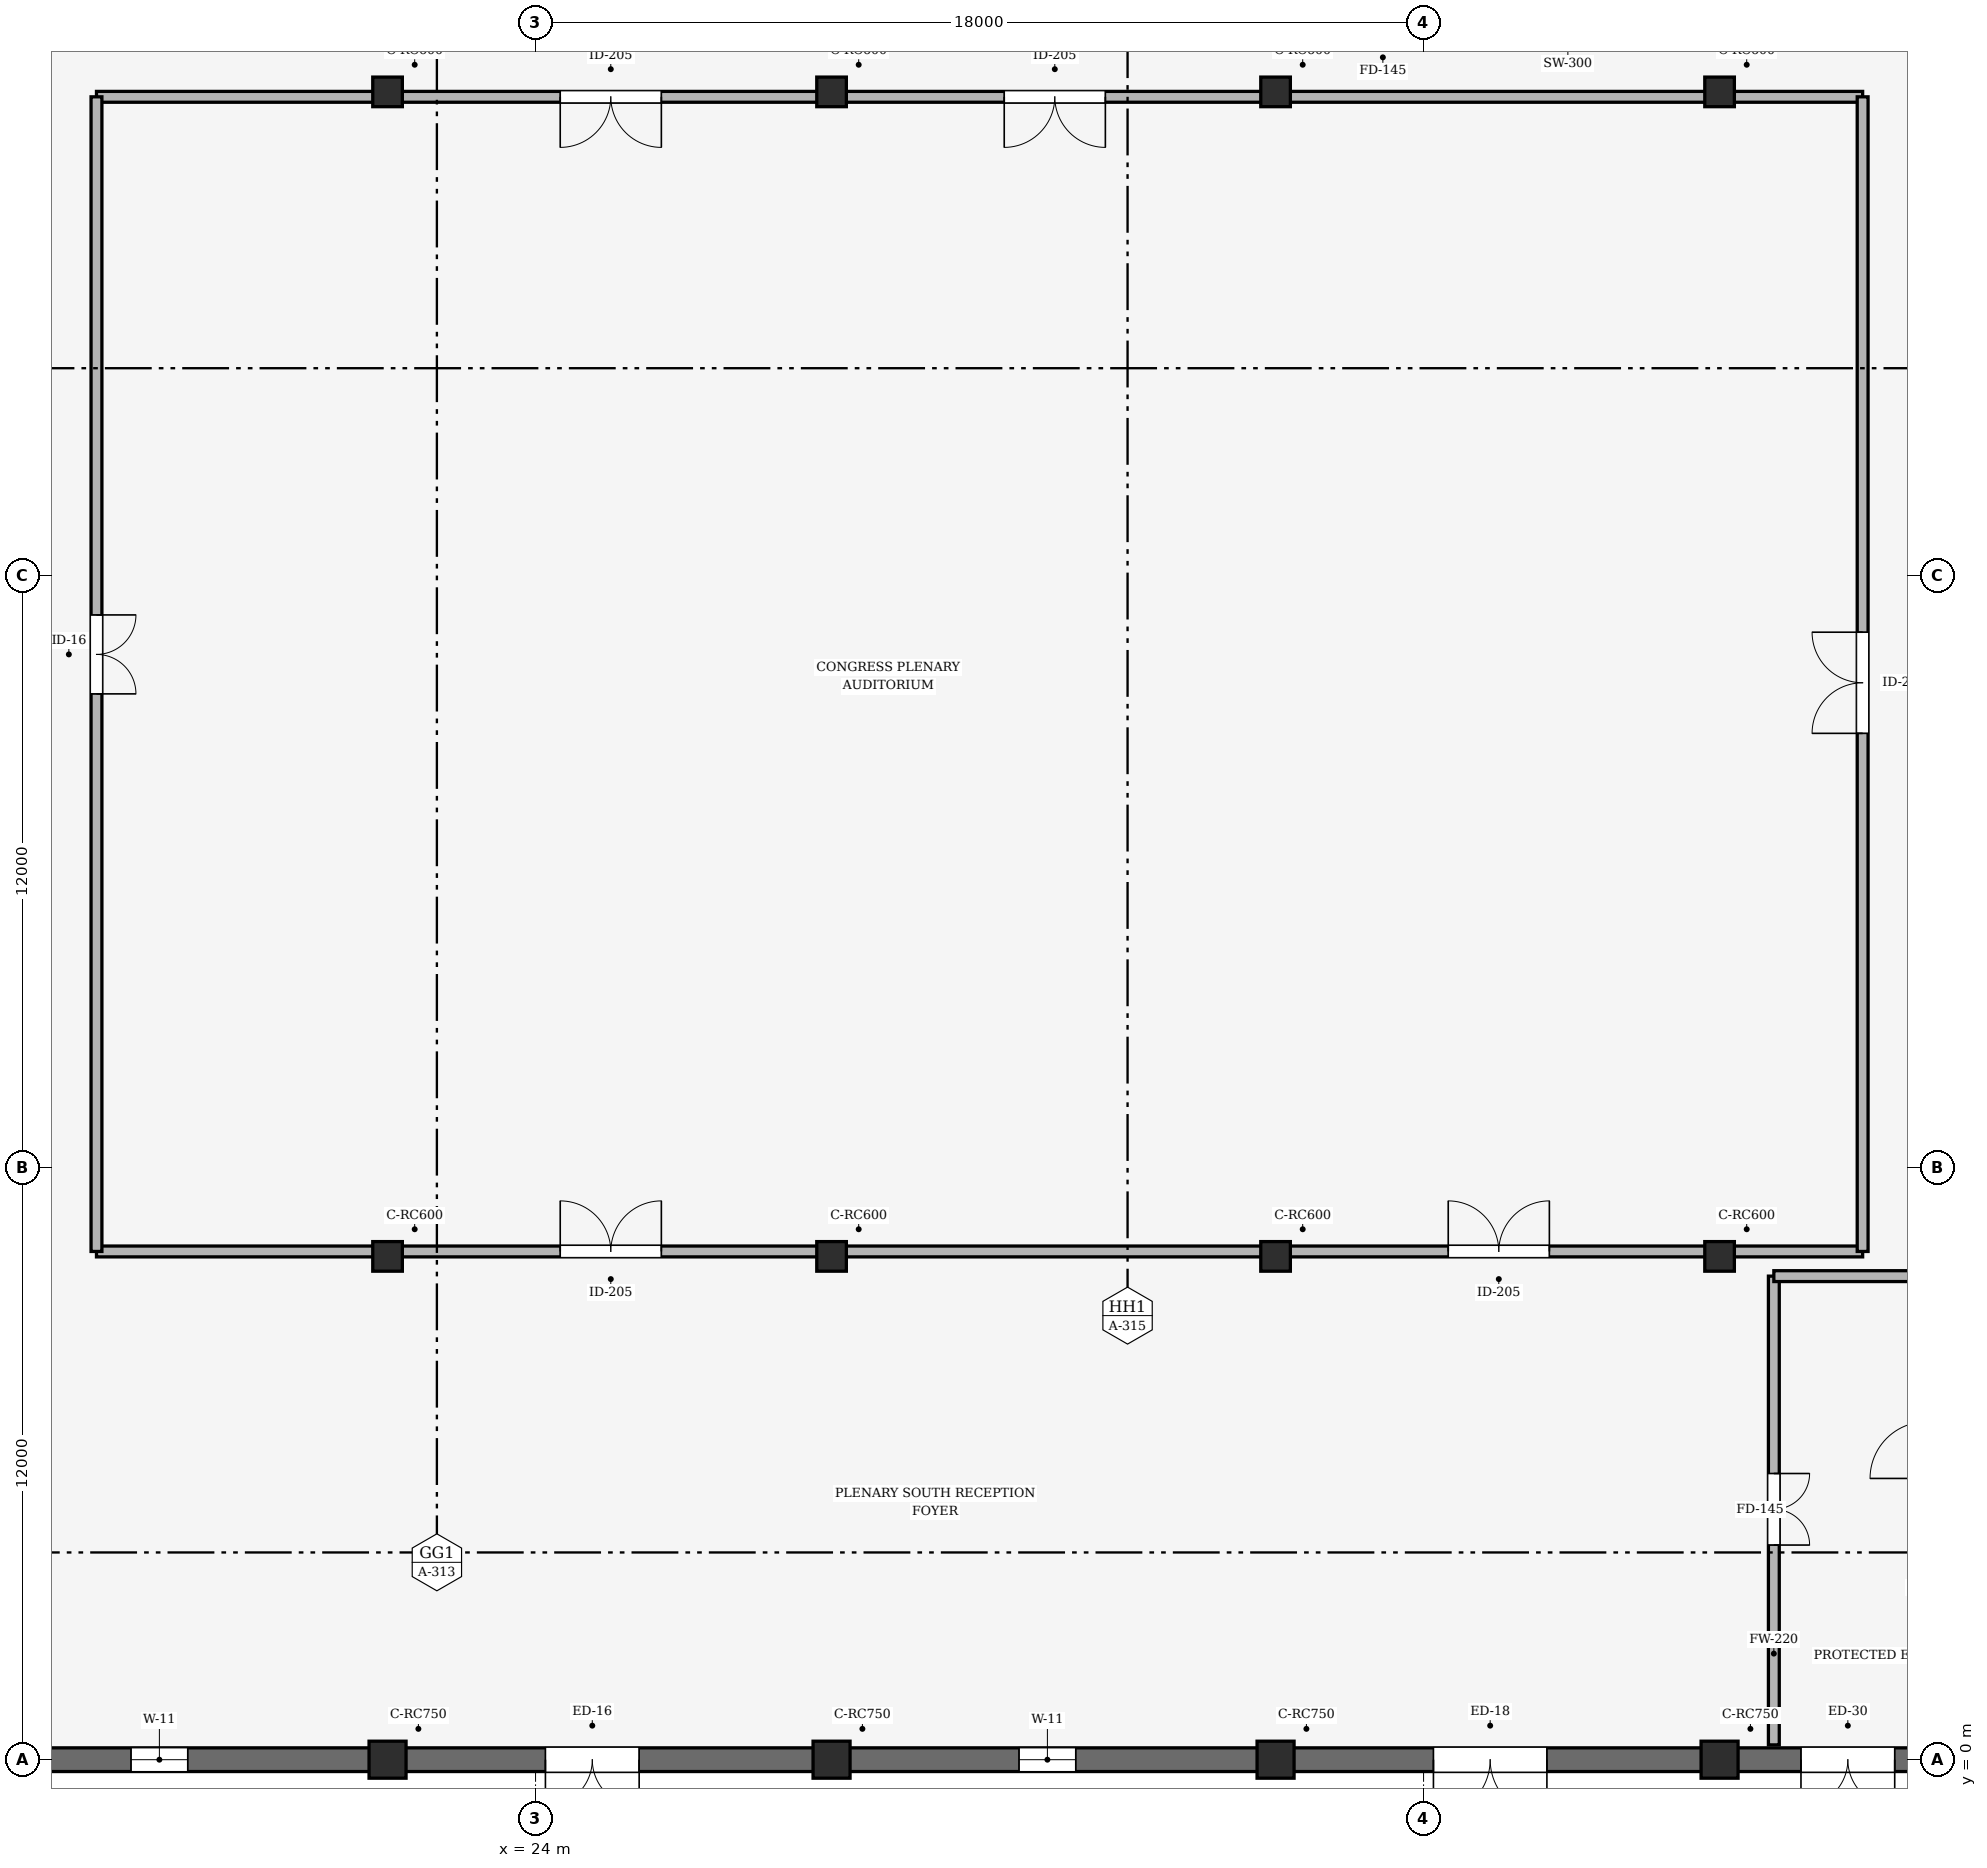
"""IFC4 building model, lengths in metres.
Left out: names, types, materials, properties, quantities, classifications, styles, units other than length and angle.
Written with IfcOpenShell. Run it as: python <this file> out.ifc"""

import sys

from ifc_helpers import new_model, si_unit, direction, frame, frame_2d, origin, origin_2d, place, context, subcontext, project, spatial, rectangle, extrude, element, fill, save


model = new_model("IFC4")
c1 = context("Model", 3, precision=1e-05, world=origin(), true_north=direction((0.0, 1.0)))
c2 = subcontext(c1, "Body", "Model", "MODEL_VIEW")
j1 = project(units=[si_unit("LENGTHUNIT", "METRE"), si_unit("PLANEANGLEUNIT", "RADIAN")], contexts=[c1])
p1 = place(None, origin())
s1 = spatial("IfcSite", under=j1, at=p1, CompositionType="ELEMENT")
p2 = place(p1, origin())
s2 = spatial("IfcBuilding", under=s1, at=p2, CompositionType="ELEMENT")
p3 = place(p2, origin())
s3 = spatial("IfcBuildingStorey", under=s2, at=p3, CompositionType="ELEMENT", Elevation=0.0)
p4 = place(p3, frame((21.0, 0.0, -0.44), z_axis=(0.0, 0.0, 1.0), x_axis=(1.0, 0.0, 0.0)))
e1 = element("IfcColumn", 1, at=p4, inside=s3, PredefinedType="COLUMN", context=c2, shape_type="SweptSolid", body=[
    extrude(rectangle(XDim=0.75, YDim=0.75, at=origin_2d()), origin(), (0.0, 0.0, 1.0), 5.84),
])
for number, where, z_axis, x_axis in (
    (2, (21.0, 10.2, -0.44), (0.0, 0.0, 1.0), (1.0, 0.0, 0.0)),
    (3, (21.0, 33.8, -0.44), (0.0, 0.0, 1.0), (1.0, 0.0, 0.0)),
):
    element("IfcColumn", number, at=place(p3, frame(where, z_axis=z_axis, x_axis=x_axis)), inside=s3, PredefinedType="COLUMN", context=c2, shape_type="SweptSolid", body=[
        extrude(rectangle(XDim=0.6, YDim=0.6, at=origin_2d()), origin(), (0.0, 0.0, 1.0), 5.84),
    ])
p5 = place(p3, frame((30.0, 0.0, -0.44), z_axis=(0.0, 0.0, 1.0), x_axis=(1.0, 0.0, 0.0)))
e4 = element("IfcColumn", 4, at=p5, inside=s3, PredefinedType="COLUMN", context=c2, shape_type="SweptSolid", body=[
    extrude(rectangle(XDim=0.75, YDim=0.75, at=origin_2d()), origin(), (0.0, 0.0, 1.0), 5.84),
])
for number, where, z_axis, x_axis in (
    (5, (30.0, 10.2, -0.44), (0.0, 0.0, 1.0), (1.0, 0.0, 0.0)),
    (6, (30.0, 33.8, -0.44), (0.0, 0.0, 1.0), (1.0, 0.0, 0.0)),
):
    element("IfcColumn", number, at=place(p3, frame(where, z_axis=z_axis, x_axis=x_axis)), inside=s3, PredefinedType="COLUMN", context=c2, shape_type="SweptSolid", body=[
        extrude(rectangle(XDim=0.6, YDim=0.6, at=origin_2d()), origin(), (0.0, 0.0, 1.0), 5.84),
    ])
p6 = place(p3, frame((39.0, 0.0, -0.44), z_axis=(0.0, 0.0, 1.0), x_axis=(1.0, 0.0, 0.0)))
e7 = element("IfcColumn", 7, at=p6, inside=s3, PredefinedType="COLUMN", context=c2, shape_type="SweptSolid", body=[
    extrude(rectangle(XDim=0.75, YDim=0.75, at=origin_2d()), origin(), (0.0, 0.0, 1.0), 5.84),
])
for number, where, z_axis, x_axis in (
    (8, (39.0, 10.2, -0.44), (0.0, 0.0, 1.0), (1.0, 0.0, 0.0)),
    (9, (39.0, 33.8, -0.44), (0.0, 0.0, 1.0), (1.0, 0.0, 0.0)),
):
    element("IfcColumn", number, at=place(p3, frame(where, z_axis=z_axis, x_axis=x_axis)), inside=s3, PredefinedType="COLUMN", context=c2, shape_type="SweptSolid", body=[
        extrude(rectangle(XDim=0.6, YDim=0.6, at=origin_2d()), origin(), (0.0, 0.0, 1.0), 5.84),
    ])
p7 = place(p3, frame((48.0, 0.0, -0.44), z_axis=(0.0, 0.0, 1.0), x_axis=(1.0, 0.0, 0.0)))
e10 = element("IfcColumn", 10, at=p7, inside=s3, PredefinedType="COLUMN", context=c2, shape_type="SweptSolid", body=[
    extrude(rectangle(XDim=0.75, YDim=0.75, at=origin_2d()), origin(), (0.0, 0.0, 1.0), 5.84),
])
for number, where, z_axis, x_axis in (
    (11, (48.0, 10.2, -0.44), (0.0, 0.0, 1.0), (1.0, 0.0, 0.0)),
    (12, (48.0, 33.8, -0.44), (0.0, 0.0, 1.0), (1.0, 0.0, 0.0)),
):
    element("IfcColumn", number, at=place(p3, frame(where, z_axis=z_axis, x_axis=x_axis)), inside=s3, PredefinedType="COLUMN", context=c2, shape_type="SweptSolid", body=[
        extrude(rectangle(XDim=0.6, YDim=0.6, at=origin_2d()), origin(), (0.0, 0.0, 1.0), 5.84),
    ])
p8 = place(p3, frame((12.0, 0.0, 0.0), z_axis=(0.0, 0.0, 1.0), x_axis=(1.0, 0.0, 0.0)))
e13 = element("IfcWall", 13, at=p8, inside=s3, PredefinedType="SOLIDWALL", context=c2, shape_type="SweptSolid", body=[
    extrude(rectangle(XDim=9.0, YDim=0.48, at=frame_2d((4.5, 0.0))), origin(), (0.0, 0.0, 1.0), 4.65),
])
p9 = place(p8, frame((3.8, 0.0, 1.3)))
e14 = element("IfcOpeningElement", 14, at=p9, cuts=e13, PredefinedType="OPENING", context=c2, shape_type="SweptSolid", body=[
    extrude(rectangle(XDim=1.15, YDim=1.7, at=frame_2d((0.575, 0.85))), frame((0.0, 0.25, 0.0), z_axis=(0.0, -1.0, 0.0), x_axis=(1.0, 0.0, 0.0)), (0.0, 0.0, 1.0), 0.5),
])
p10 = place(p3, frame((21.0, 0.0, 0.0), z_axis=(0.0, 0.0, 1.0), x_axis=(1.0, 0.0, 0.0)))
e15 = element("IfcWall", 15, at=p10, inside=s3, PredefinedType="SOLIDWALL", context=c2, shape_type="SweptSolid", body=[
    extrude(rectangle(XDim=9.0, YDim=0.48, at=frame_2d((4.5, 0.0))), origin(), (0.0, 0.0, 1.0), 4.65),
])
p11 = place(p10, frame((3.2, 0.0, 0.0)))
e16 = element("IfcOpeningElement", 16, at=p11, cuts=e15, PredefinedType="OPENING", context=c2, shape_type="SweptSolid", body=[
    extrude(rectangle(XDim=1.9, YDim=2.35, at=frame_2d((0.95, 1.175))), frame((0.0, 0.25, 0.0), z_axis=(0.0, -1.0, 0.0), x_axis=(1.0, 0.0, 0.0)), (0.0, 0.0, 1.0), 0.5),
])
p12 = place(p3, frame((30.0, 0.0, 0.0), z_axis=(0.0, 0.0, 1.0), x_axis=(1.0, 0.0, 0.0)))
e17 = element("IfcWall", 17, at=p12, inside=s3, PredefinedType="SOLIDWALL", context=c2, shape_type="SweptSolid", body=[
    extrude(rectangle(XDim=9.0, YDim=0.48, at=frame_2d((4.5, 0.0))), origin(), (0.0, 0.0, 1.0), 4.65),
])
p13 = place(p12, frame((3.8, 0.0, 1.3)))
e18 = element("IfcOpeningElement", 18, at=p13, cuts=e17, PredefinedType="OPENING", context=c2, shape_type="SweptSolid", body=[
    extrude(rectangle(XDim=1.15, YDim=1.7, at=frame_2d((0.575, 0.85))), frame((0.0, 0.25, 0.0), z_axis=(0.0, -1.0, 0.0), x_axis=(1.0, 0.0, 0.0)), (0.0, 0.0, 1.0), 0.5),
])
p14 = place(p3, frame((39.0, 0.0, 0.0), z_axis=(0.0, 0.0, 1.0), x_axis=(1.0, 0.0, 0.0)))
e19 = element("IfcWall", 19, at=p14, inside=s3, PredefinedType="SOLIDWALL", context=c2, shape_type="SweptSolid", body=[
    extrude(rectangle(XDim=9.0, YDim=0.48, at=frame_2d((4.5, 0.0))), origin(), (0.0, 0.0, 1.0), 4.65),
])
p15 = place(p14, frame((3.2, 0.0, 0.0)))
e20 = element("IfcOpeningElement", 20, at=p15, cuts=e19, PredefinedType="OPENING", context=c2, shape_type="SweptSolid", body=[
    extrude(rectangle(XDim=2.3, YDim=2.55, at=frame_2d((1.15, 1.275))), frame((0.0, 0.25, 0.0), z_axis=(0.0, -1.0, 0.0), x_axis=(1.0, 0.0, 0.0)), (0.0, 0.0, 1.0), 0.5),
])
p16 = place(p3, frame((48.0, 0.0, 0.0), z_axis=(0.0, 0.0, 1.0), x_axis=(1.0, 0.0, 0.0)))
e21 = element("IfcWall", 21, at=p16, inside=s3, PredefinedType="SOLIDWALL", context=c2, shape_type="SweptSolid", body=[
    extrude(rectangle(XDim=9.0, YDim=0.48, at=frame_2d((4.5, 0.0))), origin(), (0.0, 0.0, 1.0), 4.65),
])
p17 = place(p16, frame((1.65, 0.0, 0.0)))
e22 = element("IfcOpeningElement", 22, at=p17, cuts=e21, PredefinedType="OPENING", context=c2, shape_type="SweptSolid", body=[
    extrude(rectangle(XDim=1.9, YDim=2.35, at=frame_2d((0.95, 1.175))), frame((0.0, 0.25, 0.0), z_axis=(0.0, -1.0, 0.0), x_axis=(1.0, 0.0, 0.0)), (0.0, 0.0, 1.0), 0.5),
])
p18 = place(p3, frame((49.1, 9.8, 0.0), z_axis=(0.0, 0.0, 1.0), x_axis=(0.0, -1.0, 0.0)))
e23 = element("IfcWall", 23, at=p18, inside=s3, PredefinedType="SOLIDWALL", context=c2, shape_type="SweptSolid", body=[
    extrude(rectangle(XDim=9.5, YDim=0.22, at=frame_2d((4.75, 0.0))), origin(), (0.0, 0.0, 1.0), 4.6),
])
p19 = place(p18, frame((4.0, 0.0, 0.0)))
e24 = element("IfcOpeningElement", 24, at=p19, cuts=e23, PredefinedType="OPENING", context=c2, shape_type="SweptSolid", body=[
    extrude(rectangle(XDim=1.45, YDim=2.15, at=frame_2d((0.725, 1.075))), frame((0.0, 0.12, 0.0), z_axis=(0.0, -1.0, 0.0), x_axis=(1.0, 0.0, 0.0)), (0.0, 0.0, 1.0), 0.24),
])
p20 = place(p3, frame((49.1, 9.8, 0.0), z_axis=(0.0, 0.0, 1.0), x_axis=(1.0, 0.0, 0.0)))
e25 = element("IfcWall", 25, at=p20, inside=s3, PredefinedType="SOLIDWALL", context=c2, shape_type="SweptSolid", body=[
    extrude(rectangle(XDim=2.9, YDim=0.22, at=frame_2d((1.45, 0.0))), origin(), (0.0, 0.0, 1.0), 4.6),
])
p21 = place(p3, frame((15.1, 10.3, 0.0), z_axis=(0.0, 0.0, 1.0), x_axis=(1.0, 0.0, 0.0)))
e26 = element("IfcWall", 26, at=p21, inside=s3, PredefinedType="SOLIDWALL", context=c2, shape_type="SweptSolid", body=[
    extrude(rectangle(XDim=35.8, YDim=0.22, at=frame_2d((17.9, 0.0))), origin(), (0.0, 0.0, 1.0), 4.1),
])
p22 = place(p21, frame((9.4, 0.0, 0.0)))
e27 = element("IfcOpeningElement", 27, at=p22, cuts=e26, PredefinedType="OPENING", context=c2, shape_type="SweptSolid", body=[
    extrude(rectangle(XDim=2.05, YDim=2.3, at=frame_2d((1.025, 1.15))), frame((0.0, 0.12, 0.0), z_axis=(0.0, -1.0, 0.0), x_axis=(1.0, 0.0, 0.0)), (0.0, 0.0, 1.0), 0.24),
])
p23 = place(p21, frame((27.4, 0.0, 0.0)))
e28 = element("IfcOpeningElement", 28, at=p23, cuts=e26, PredefinedType="OPENING", context=c2, shape_type="SweptSolid", body=[
    extrude(rectangle(XDim=2.05, YDim=2.3, at=frame_2d((1.025, 1.15))), frame((0.0, 0.12, 0.0), z_axis=(0.0, -1.0, 0.0), x_axis=(1.0, 0.0, 0.0)), (0.0, 0.0, 1.0), 0.24),
])
p24 = place(p3, frame((50.9, 33.7, 0.0), z_axis=(0.0, 0.0, 1.0), x_axis=(-1.0, 0.0, 0.0)))
e29 = element("IfcWall", 29, at=p24, inside=s3, PredefinedType="SOLIDWALL", context=c2, shape_type="SweptSolid", body=[
    extrude(rectangle(XDim=35.8, YDim=0.22, at=frame_2d((17.9, 0.0))), origin(), (0.0, 0.0, 1.0), 4.1),
])
p25 = place(p24, frame((15.35, 0.0, 0.0)))
e30 = element("IfcOpeningElement", 30, at=p25, cuts=e29, PredefinedType="OPENING", context=c2, shape_type="SweptSolid", body=[
    extrude(rectangle(XDim=2.05, YDim=2.3, at=frame_2d((1.025, 1.15))), frame((0.0, 0.12, 0.0), z_axis=(0.0, -1.0, 0.0), x_axis=(1.0, 0.0, 0.0)), (0.0, 0.0, 1.0), 0.24),
])
p26 = place(p24, frame((24.35, 0.0, 0.0)))
e31 = element("IfcOpeningElement", 31, at=p26, cuts=e29, PredefinedType="OPENING", context=c2, shape_type="SweptSolid", body=[
    extrude(rectangle(XDim=2.05, YDim=2.3, at=frame_2d((1.025, 1.15))), frame((0.0, 0.12, 0.0), z_axis=(0.0, -1.0, 0.0), x_axis=(1.0, 0.0, 0.0)), (0.0, 0.0, 1.0), 0.24),
])
p27 = place(p3, frame((50.9, 10.3, 0.0), z_axis=(0.0, 0.0, 1.0), x_axis=(0.0, 1.0, 0.0)))
e32 = element("IfcWall", 32, at=p27, inside=s3, PredefinedType="SOLIDWALL", context=c2, shape_type="SweptSolid", body=[
    extrude(rectangle(XDim=23.4, YDim=0.22, at=frame_2d((11.7, 0.0))), origin(), (0.0, 0.0, 1.0), 4.1),
])
p28 = place(p27, frame((10.5, 0.0, 0.0)))
e33 = element("IfcOpeningElement", 33, at=p28, cuts=e32, PredefinedType="OPENING", context=c2, shape_type="SweptSolid", body=[
    extrude(rectangle(XDim=2.05, YDim=2.3, at=frame_2d((1.025, 1.15))), frame((0.0, 0.12, 0.0), z_axis=(0.0, -1.0, 0.0), x_axis=(1.0, 0.0, 0.0)), (0.0, 0.0, 1.0), 0.24),
])
p29 = place(p3, frame((15.1, 33.7, 0.0), z_axis=(0.0, 0.0, 1.0), x_axis=(0.0, -1.0, 0.0)))
e34 = element("IfcWall", 34, at=p29, inside=s3, PredefinedType="SOLIDWALL", context=c2, shape_type="SweptSolid", body=[
    extrude(rectangle(XDim=23.4, YDim=0.22, at=frame_2d((11.7, 0.0))), origin(), (0.0, 0.0, 1.0), 4.1),
])
p30 = place(p29, frame((10.5, 0.0, 0.0)))
e35 = element("IfcOpeningElement", 35, at=p30, cuts=e34, PredefinedType="OPENING", context=c2, shape_type="SweptSolid", body=[
    extrude(rectangle(XDim=1.6, YDim=2.2, at=frame_2d((0.8, 1.1))), frame((0.0, 0.12, 0.0), z_axis=(0.0, -1.0, 0.0), x_axis=(1.0, 0.0, 0.0)), (0.0, 0.0, 1.0), 0.24),
])
p31 = place(p9, origin())
e36 = element("IfcWindow", 36, at=p31, inside=s3, PartitioningType="SINGLE_PANEL", PredefinedType="WINDOW", context=c2, shape_type="SweptSolid", body=[
    extrude(rectangle(XDim=1.15, YDim=1.7, at=frame_2d((0.575, 0.85))), frame((0.0, 0.03, 0.0), z_axis=(0.0, -1.0, 0.0), x_axis=(1.0, 0.0, 0.0)), (0.0, 0.0, 1.0), 0.06),
])
fill(e14, e36)
p32 = place(p11, frame((1.9, 0.0, 0.0), z_axis=(0.0, 0.0, 1.0), x_axis=(-1.0, 0.0, 0.0)))
e37 = element("IfcDoor", 37, at=p32, inside=s3, OperationType="DOUBLE_DOOR_SINGLE_SWING", PredefinedType="DOOR", context=c2, shape_type="SweptSolid", body=[
    extrude(rectangle(XDim=1.9, YDim=2.35, at=frame_2d((0.95, 1.175))), frame((0.0, 0.025, 0.0), z_axis=(0.0, -1.0, 0.0), x_axis=(1.0, 0.0, 0.0)), (0.0, 0.0, 1.0), 0.05),
])
fill(e16, e37)
p33 = place(p13, origin())
e38 = element("IfcWindow", 38, at=p33, inside=s3, PartitioningType="SINGLE_PANEL", PredefinedType="WINDOW", context=c2, shape_type="SweptSolid", body=[
    extrude(rectangle(XDim=1.15, YDim=1.7, at=frame_2d((0.575, 0.85))), frame((0.0, 0.03, 0.0), z_axis=(0.0, -1.0, 0.0), x_axis=(1.0, 0.0, 0.0)), (0.0, 0.0, 1.0), 0.06),
])
fill(e18, e38)
p34 = place(p15, frame((2.3, 0.0, 0.0), z_axis=(0.0, 0.0, 1.0), x_axis=(-1.0, 0.0, 0.0)))
e39 = element("IfcDoor", 39, at=p34, inside=s3, OperationType="DOUBLE_DOOR_SINGLE_SWING", PredefinedType="DOOR", context=c2, shape_type="SweptSolid", body=[
    extrude(rectangle(XDim=2.3, YDim=2.55, at=frame_2d((1.15, 1.275))), frame((0.0, 0.025, 0.0), z_axis=(0.0, -1.0, 0.0), x_axis=(1.0, 0.0, 0.0)), (0.0, 0.0, 1.0), 0.05),
])
fill(e20, e39)
p35 = place(p17, frame((1.9, 0.0, 0.0), z_axis=(0.0, 0.0, 1.0), x_axis=(-1.0, 0.0, 0.0)))
e40 = element("IfcDoor", 40, at=p35, inside=s3, OperationType="DOUBLE_DOOR_SINGLE_SWING", PredefinedType="DOOR", context=c2, shape_type="SweptSolid", body=[
    extrude(rectangle(XDim=1.9, YDim=2.35, at=frame_2d((0.95, 1.175))), frame((0.0, 0.025, 0.0), z_axis=(0.0, -1.0, 0.0), x_axis=(1.0, 0.0, 0.0)), (0.0, 0.0, 1.0), 0.05),
])
fill(e22, e40)
p36 = place(p19, origin())
e41 = element("IfcDoor", 41, at=p36, inside=s3, OperationType="DOUBLE_DOOR_SINGLE_SWING", PredefinedType="DOOR", context=c2, shape_type="SweptSolid", body=[
    extrude(rectangle(XDim=1.45, YDim=2.15, at=frame_2d((0.725, 1.075))), frame((0.0, 0.025, 0.0), z_axis=(0.0, -1.0, 0.0), x_axis=(1.0, 0.0, 0.0)), (0.0, 0.0, 1.0), 0.05),
])
fill(e24, e41)
p37 = place(p22, origin())
e42 = element("IfcDoor", 42, at=p37, inside=s3, OperationType="DOUBLE_DOOR_SINGLE_SWING", PredefinedType="DOOR", context=c2, shape_type="SweptSolid", body=[
    extrude(rectangle(XDim=2.05, YDim=2.3, at=frame_2d((1.025, 1.15))), frame((0.0, 0.025, 0.0), z_axis=(0.0, -1.0, 0.0), x_axis=(1.0, 0.0, 0.0)), (0.0, 0.0, 1.0), 0.05),
])
fill(e27, e42)
p38 = place(p23, origin())
e43 = element("IfcDoor", 43, at=p38, inside=s3, OperationType="DOUBLE_DOOR_SINGLE_SWING", PredefinedType="DOOR", context=c2, shape_type="SweptSolid", body=[
    extrude(rectangle(XDim=2.05, YDim=2.3, at=frame_2d((1.025, 1.15))), frame((0.0, 0.025, 0.0), z_axis=(0.0, -1.0, 0.0), x_axis=(1.0, 0.0, 0.0)), (0.0, 0.0, 1.0), 0.05),
])
fill(e28, e43)
p39 = place(p25, origin())
e44 = element("IfcDoor", 44, at=p39, inside=s3, OperationType="DOUBLE_DOOR_SINGLE_SWING", PredefinedType="DOOR", context=c2, shape_type="SweptSolid", body=[
    extrude(rectangle(XDim=2.05, YDim=2.3, at=frame_2d((1.025, 1.15))), frame((0.0, 0.025, 0.0), z_axis=(0.0, -1.0, 0.0), x_axis=(1.0, 0.0, 0.0)), (0.0, 0.0, 1.0), 0.05),
])
fill(e30, e44)
p40 = place(p26, origin())
e45 = element("IfcDoor", 45, at=p40, inside=s3, OperationType="DOUBLE_DOOR_SINGLE_SWING", PredefinedType="DOOR", context=c2, shape_type="SweptSolid", body=[
    extrude(rectangle(XDim=2.05, YDim=2.3, at=frame_2d((1.025, 1.15))), frame((0.0, 0.025, 0.0), z_axis=(0.0, -1.0, 0.0), x_axis=(1.0, 0.0, 0.0)), (0.0, 0.0, 1.0), 0.05),
])
fill(e31, e45)
p41 = place(p28, origin())
e46 = element("IfcDoor", 46, at=p41, inside=s3, OperationType="DOUBLE_DOOR_SINGLE_SWING", PredefinedType="DOOR", context=c2, shape_type="SweptSolid", body=[
    extrude(rectangle(XDim=2.05, YDim=2.3, at=frame_2d((1.025, 1.15))), frame((0.0, 0.025, 0.0), z_axis=(0.0, -1.0, 0.0), x_axis=(1.0, 0.0, 0.0)), (0.0, 0.0, 1.0), 0.05),
])
fill(e33, e46)
p42 = place(p30, origin())
e47 = element("IfcDoor", 47, at=p42, inside=s3, OperationType="DOUBLE_DOOR_SINGLE_SWING", PredefinedType="DOOR", context=c2, shape_type="SweptSolid", body=[
    extrude(rectangle(XDim=1.6, YDim=2.2, at=frame_2d((0.8, 1.1))), frame((0.0, 0.025, 0.0), z_axis=(0.0, -1.0, 0.0), x_axis=(1.0, 0.0, 0.0)), (0.0, 0.0, 1.0), 0.05),
])
fill(e35, e47)
save(model, sys.argv[1])
